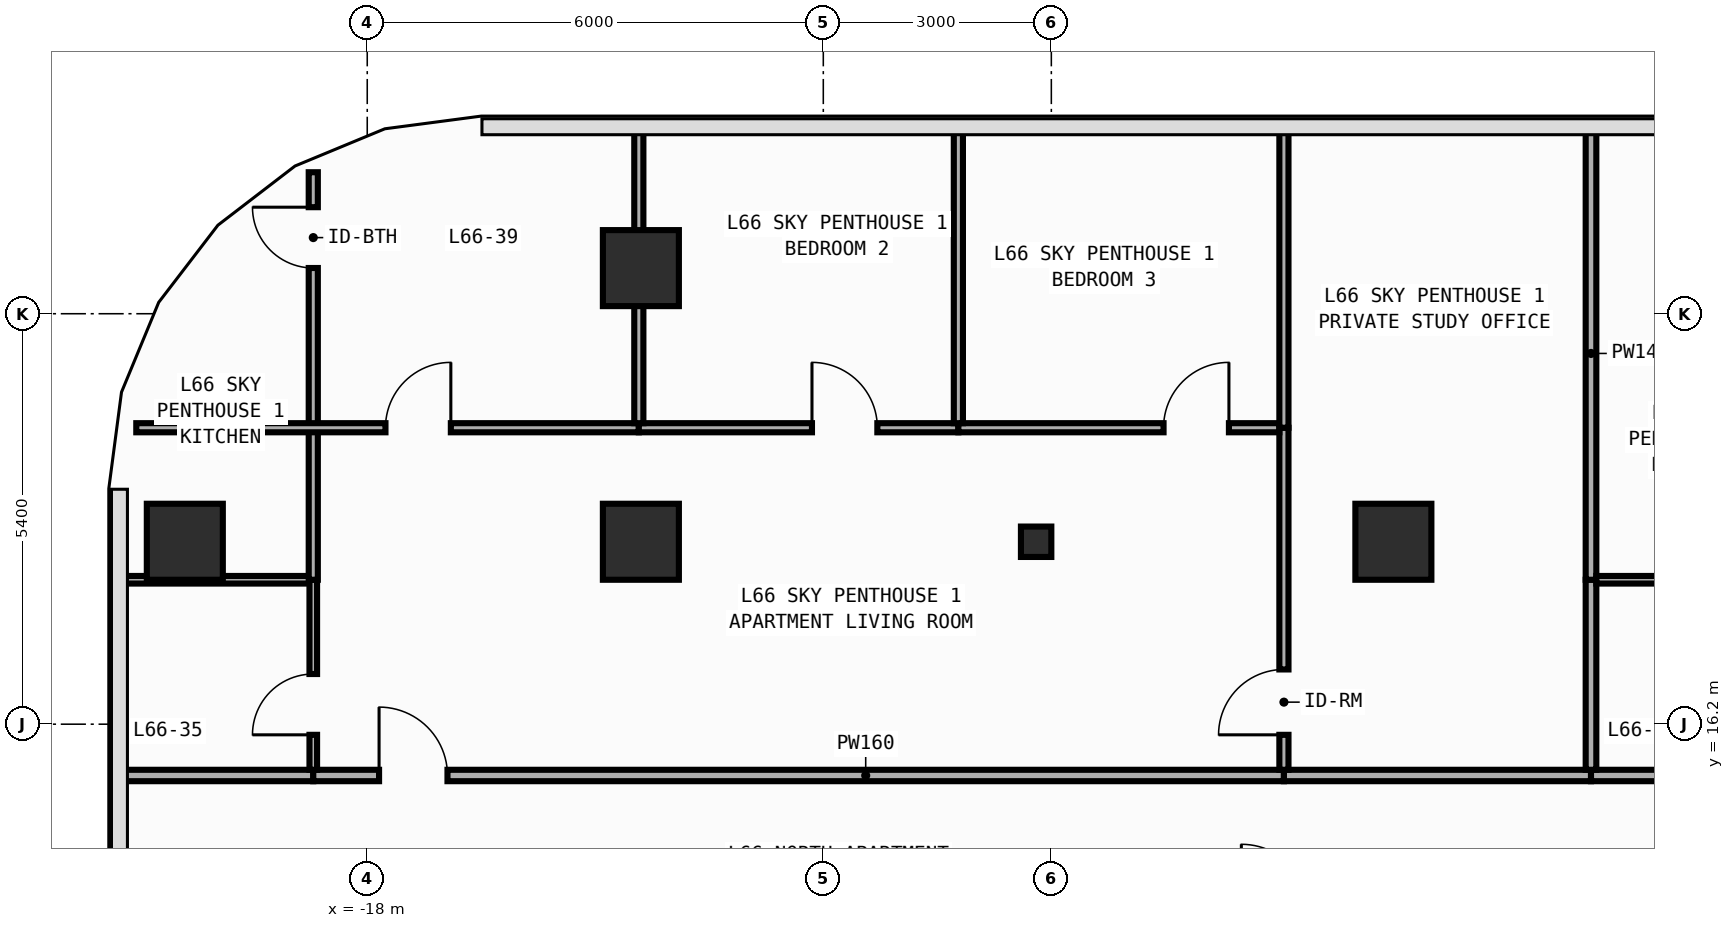
"""IFC4 building model, lengths in metres.
Left out: names, types, materials, properties, quantities, classifications, styles, units other than length and angle.
Written with IfcOpenShell. Run it as: python <this file> out.ifc"""

import sys

from ifc_helpers import new_model, si_unit, direction, frame, frame_2d, origin, origin_2d, place, context, subcontext, project, spatial, rectangle, circle, i_section, extrude, element, fill, save


model = new_model("IFC4")
c1 = context("Model", 3, precision=1e-05, world=origin(), true_north=direction((0.0, 1.0)))
c2 = subcontext(c1, "Body", "Model", "MODEL_VIEW")
j1 = project(units=[si_unit("LENGTHUNIT", "METRE"), si_unit("PLANEANGLEUNIT", "RADIAN")], contexts=[c1])
p1 = place(None, origin())
s1 = spatial("IfcSite", under=j1, at=p1, CompositionType="ELEMENT")
p2 = place(p1, origin())
s2 = spatial("IfcBuilding", under=s1, at=p2, CompositionType="ELEMENT")
p3 = place(p2, frame((0.0, 0.0, 277.6)))
s3 = spatial("IfcBuildingStorey", under=s2, at=p3, CompositionType="ELEMENT", Elevation=277.6)
p4 = place(p3, frame((-9.2, 18.6, 0.0), z_axis=(0.0, 0.0, 1.0), x_axis=(1.0, 0.0, 0.0)))
e1 = element("IfcColumn", 1, at=p4, inside=s3, PredefinedType="COLUMN", context=c2, shape_type="SweptSolid", body=[
    extrude(i_section(OverallWidth=0.4, OverallDepth=0.4, WebThickness=0.013, FlangeThickness=0.021, FilletRadius=0.022, at=origin_2d()), origin(), (0.0, 0.0, 1.0), 3.8),
])
for number, where, z_axis, x_axis in (
    (2, (-20.4, 18.6, 0.0), (0.0, 0.0, 1.0), (1.0, 0.0, 0.0)),
    (3, (-14.4, 18.6, 0.0), (0.0, 0.0, 1.0), (1.0, 0.0, 0.0)),
    (4, (-4.5, 18.6, 0.0), (0.0, 0.0, 1.0), (1.0, 0.0, 0.0)),
    (5, (-14.4, 22.2, 0.0), (0.0, 0.0, 1.0), (1.0, 0.0, 0.0)),
):
    element("IfcColumn", number, at=place(p3, frame(where, z_axis=z_axis, x_axis=x_axis)), inside=s3, PredefinedType="COLUMN", context=c2, shape_type="SweptSolid", body=[
        extrude(circle(Radius=0.5, at=origin_2d()), origin(), (0.0, 0.0, 1.0), 3.8),
    ])
p5 = place(p3, frame((-21.255, 15.525, 0.0), z_axis=(0.0, 0.0, 1.0), x_axis=(1.0, 0.0, 0.0)))
e6 = element("IfcWall", 6, at=p5, inside=s3, PredefinedType="PARTITIONING", context=c2, shape_type="SweptSolid", body=[
    extrude(rectangle(XDim=2.545, YDim=0.15, at=frame_2d((1.272, 0.0))), origin(), (0.0, 0.0, 1.0), 3.54),
])
p6 = place(p3, frame((-18.71, 15.525, 0.0), z_axis=(0.0, 0.0, 1.0), x_axis=(1.0, 0.0, 0.0)))
e7 = element("IfcWall", 7, at=p6, inside=s3, PredefinedType="PARTITIONING", context=c2, shape_type="SweptSolid", body=[
    extrude(rectangle(XDim=12.77, YDim=0.15, at=frame_2d((6.385, 0.0))), origin(), (0.0, 0.0, 1.0), 3.54),
])
p7 = place(p6, frame((0.865, 0.0, 0.0)))
e8 = element("IfcOpeningElement", 8, at=p7, cuts=e7, PredefinedType="OPENING", context=c2, shape_type="SweptSolid", body=[
    extrude(rectangle(XDim=0.9, YDim=2.15, at=frame_2d((0.45, 1.075))), frame((0.0, 0.085, 0.0), z_axis=(0.0, -1.0, 0.0), x_axis=(1.0, 0.0, 0.0)), (0.0, 0.0, 1.0), 0.17),
])
p8 = place(p3, frame((-5.94, 15.525, 0.0), z_axis=(0.0, 0.0, 1.0), x_axis=(1.0, 0.0, 0.0)))
e9 = element("IfcWall", 9, at=p8, inside=s3, PredefinedType="PARTITIONING", context=c2, shape_type="SweptSolid", body=[
    extrude(rectangle(XDim=4.04, YDim=0.15, at=frame_2d((2.02, 0.0))), origin(), (0.0, 0.0, 1.0), 3.54),
])
p9 = place(p3, frame((-1.9, 15.525, 0.0), z_axis=(0.0, 0.0, 1.0), x_axis=(1.0, 0.0, 0.0)))
e10 = element("IfcWall", 10, at=p9, inside=s3, PredefinedType="PARTITIONING", context=c2, shape_type="SweptSolid", body=[
    extrude(rectangle(XDim=2.59, YDim=0.15, at=frame_2d((1.295, 0.0))), origin(), (0.0, 0.0, 1.0), 3.54),
])
p10 = place(p3, frame((-21.255, 18.1, 0.0), z_axis=(0.0, 0.0, 1.0), x_axis=(1.0, 0.0, 0.0)))
e11 = element("IfcWall", 11, at=p10, inside=s3, PredefinedType="PARTITIONING", context=c2, shape_type="SweptSolid", body=[
    extrude(rectangle(XDim=2.495, YDim=0.1, at=frame_2d((1.248, 0.0))), origin(), (0.0, 0.0, 1.0), 3.54),
])
p11 = place(p3, frame((-18.71, 15.6, 0.0), z_axis=(0.0, 0.0, 1.0), x_axis=(0.0, 1.0, 0.0)))
e12 = element("IfcWall", 12, at=p11, inside=s3, PredefinedType="PARTITIONING", context=c2, shape_type="SweptSolid", body=[
    extrude(rectangle(XDim=2.5, YDim=0.1, at=frame_2d((1.25, 0.0))), origin(), (0.0, 0.0, 1.0), 3.54),
])
p12 = place(p11, frame((0.46, 0.0, 0.0)))
e13 = element("IfcOpeningElement", 13, at=p12, cuts=e12, PredefinedType="OPENING", context=c2, shape_type="SweptSolid", body=[
    extrude(rectangle(XDim=0.8, YDim=2.1, at=frame_2d((0.4, 1.05))), frame((0.0, 0.06, 0.0), z_axis=(0.0, -1.0, 0.0), x_axis=(1.0, 0.0, 0.0)), (0.0, 0.0, 1.0), 0.12),
])
p13 = place(p3, frame((-18.71, 18.1, 0.0), z_axis=(0.0, 0.0, 1.0), x_axis=(0.0, 1.0, 0.0)))
e14 = element("IfcWall", 14, at=p13, inside=s3, PredefinedType="PARTITIONING", context=c2, shape_type="SweptSolid", body=[
    extrude(rectangle(XDim=2.0, YDim=0.12, at=frame_2d((1.0, 0.0))), origin(), (0.0, 0.0, 1.0), 3.54),
])
p14 = place(p3, frame((-18.71, 20.1, 0.0), z_axis=(0.0, 0.0, 1.0), x_axis=(0.0, 1.0, 0.0)))
e15 = element("IfcWall", 15, at=p14, inside=s3, PredefinedType="PARTITIONING", context=c2, shape_type="SweptSolid", body=[
    extrude(rectangle(XDim=3.361, YDim=0.12, at=frame_2d((1.681, 0.0))), origin(), (0.0, 0.0, 1.0), 3.54),
])
p15 = place(p14, frame((2.102, 0.0, 0.0)))
e16 = element("IfcOpeningElement", 16, at=p15, cuts=e15, PredefinedType="OPENING", context=c2, shape_type="SweptSolid", body=[
    extrude(rectangle(XDim=0.8, YDim=2.1, at=frame_2d((0.4, 1.05))), frame((0.0, 0.07, 0.0), z_axis=(0.0, -1.0, 0.0), x_axis=(1.0, 0.0, 0.0)), (0.0, 0.0, 1.0), 0.14),
])
p16 = place(p3, frame((-5.94, 15.6, 0.0), z_axis=(0.0, 0.0, 1.0), x_axis=(0.0, 1.0, 0.0)))
e17 = element("IfcWall", 17, at=p16, inside=s3, PredefinedType="PARTITIONING", context=c2, shape_type="SweptSolid", body=[
    extrude(rectangle(XDim=4.5, YDim=0.12, at=frame_2d((2.25, 0.0))), origin(), (0.0, 0.0, 1.0), 3.54),
])
p17 = place(p16, frame((0.46, 0.0, 0.0)))
e18 = element("IfcOpeningElement", 18, at=p17, cuts=e17, PredefinedType="OPENING", context=c2, shape_type="SweptSolid", body=[
    extrude(rectangle(XDim=0.86, YDim=2.15, at=frame_2d((0.43, 1.075))), frame((0.0, 0.07, 0.0), z_axis=(0.0, -1.0, 0.0), x_axis=(1.0, 0.0, 0.0)), (0.0, 0.0, 1.0), 0.14),
])
p18 = place(p3, frame((-21.039, 20.1, 0.0), z_axis=(0.0, 0.0, 1.0), x_axis=(1.0, 0.0, 0.0)))
e19 = element("IfcWall", 19, at=p18, inside=s3, PredefinedType="PARTITIONING", context=c2, shape_type="SweptSolid", body=[
    extrude(rectangle(XDim=6.612, YDim=0.12, at=frame_2d((3.306, 0.0))), origin(), (0.0, 0.0, 1.0), 3.54),
])
p19 = place(p18, frame((3.278, 0.0, 0.0)))
e20 = element("IfcOpeningElement", 20, at=p19, cuts=e19, PredefinedType="OPENING", context=c2, shape_type="SweptSolid", body=[
    extrude(rectangle(XDim=0.86, YDim=2.15, at=frame_2d((0.43, 1.075))), frame((0.0, 0.07, 0.0), z_axis=(0.0, -1.0, 0.0), x_axis=(1.0, 0.0, 0.0)), (0.0, 0.0, 1.0), 0.14),
])
p20 = place(p3, frame((-14.427, 20.1, 0.0), z_axis=(0.0, 0.0, 1.0), x_axis=(1.0, 0.0, 0.0)))
e21 = element("IfcWall", 21, at=p20, inside=s3, PredefinedType="PARTITIONING", context=c2, shape_type="SweptSolid", body=[
    extrude(rectangle(XDim=4.204, YDim=0.12, at=frame_2d((2.102, 0.0))), origin(), (0.0, 0.0, 1.0), 3.54),
])
p21 = place(p20, frame((2.278, 0.0, 0.0)))
e22 = element("IfcOpeningElement", 22, at=p21, cuts=e21, PredefinedType="OPENING", context=c2, shape_type="SweptSolid", body=[
    extrude(rectangle(XDim=0.86, YDim=2.15, at=frame_2d((0.43, 1.075))), frame((0.0, 0.07, 0.0), z_axis=(0.0, -1.0, 0.0), x_axis=(1.0, 0.0, 0.0)), (0.0, 0.0, 1.0), 0.14),
])
p22 = place(p3, frame((-10.223, 20.1, 0.0), z_axis=(0.0, 0.0, 1.0), x_axis=(1.0, 0.0, 0.0)))
e23 = element("IfcWall", 23, at=p22, inside=s3, PredefinedType="PARTITIONING", context=c2, shape_type="SweptSolid", body=[
    extrude(rectangle(XDim=4.223, YDim=0.12, at=frame_2d((2.111, 0.0))), origin(), (0.0, 0.0, 1.0), 3.54),
])
p23 = place(p22, frame((2.699, 0.0, 0.0)))
e24 = element("IfcOpeningElement", 24, at=p23, cuts=e23, PredefinedType="OPENING", context=c2, shape_type="SweptSolid", body=[
    extrude(rectangle(XDim=0.86, YDim=2.15, at=frame_2d((0.43, 1.075))), frame((0.0, 0.07, 0.0), z_axis=(0.0, -1.0, 0.0), x_axis=(1.0, 0.0, 0.0)), (0.0, 0.0, 1.0), 0.14),
])
p24 = place(p3, frame((-5.94, 20.1, 0.0), z_axis=(0.0, 0.0, 1.0), x_axis=(0.0, 1.0, 0.0)))
e25 = element("IfcWall", 25, at=p24, inside=s3, PredefinedType="PARTITIONING", context=c2, shape_type="SweptSolid", body=[
    extrude(rectangle(XDim=3.955, YDim=0.12, at=frame_2d((1.978, 0.0))), origin(), (0.0, 0.0, 1.0), 3.54),
])
p25 = place(p3, frame((-1.9, 15.6, 0.0), z_axis=(0.0, 0.0, 1.0), x_axis=(0.0, 1.0, 0.0)))
e26 = element("IfcWall", 26, at=p25, inside=s3, PredefinedType="PARTITIONING", context=c2, shape_type="SweptSolid", body=[
    extrude(rectangle(XDim=2.5, YDim=0.14, at=frame_2d((1.25, 0.0))), origin(), (0.0, 0.0, 1.0), 3.54),
])
p26 = place(p3, frame((-1.9, 18.1, 0.0), z_axis=(0.0, 0.0, 1.0), x_axis=(0.0, 1.0, 0.0)))
e27 = element("IfcWall", 27, at=p26, inside=s3, PredefinedType="PARTITIONING", context=c2, shape_type="SweptSolid", body=[
    extrude(rectangle(XDim=5.955, YDim=0.14, at=frame_2d((2.978, 0.0))), origin(), (0.0, 0.0, 1.0), 3.54),
])
p27 = place(p3, frame((-14.427, 20.16, 0.0), z_axis=(0.0, 0.0, 1.0), x_axis=(0.0, 1.0, 0.0)))
e28 = element("IfcWall", 28, at=p27, inside=s3, PredefinedType="PARTITIONING", context=c2, shape_type="SweptSolid", body=[
    extrude(rectangle(XDim=3.895, YDim=0.12, at=frame_2d((1.948, 0.0))), origin(), (0.0, 0.0, 1.0), 2.64),
])
p28 = place(p3, frame((-10.223, 20.16, 0.0), z_axis=(0.0, 0.0, 1.0), x_axis=(0.0, 1.0, 0.0)))
e29 = element("IfcWall", 29, at=p28, inside=s3, PredefinedType="PARTITIONING", context=c2, shape_type="SweptSolid", body=[
    extrude(rectangle(XDim=3.895, YDim=0.12, at=frame_2d((1.948, 0.0))), origin(), (0.0, 0.0, 1.0), 3.54),
])
p29 = place(p3, frame((-1.83, 18.1, 0.0), z_axis=(0.0, 0.0, 1.0), x_axis=(1.0, 0.0, 0.0)))
e30 = element("IfcWall", 30, at=p29, inside=s3, PredefinedType="PARTITIONING", context=c2, shape_type="SweptSolid", body=[
    extrude(rectangle(XDim=2.47, YDim=0.1, at=frame_2d((1.235, 0.0))), origin(), (0.0, 0.0, 1.0), 3.54),
])
p30 = place(p7, origin())
e31 = element("IfcDoor", 31, at=p30, inside=s3, OperationType="SINGLE_SWING_LEFT", PredefinedType="DOOR", context=c2, shape_type="SweptSolid", body=[
    extrude(rectangle(XDim=0.9, YDim=2.15, at=frame_2d((0.45, 1.075))), frame((0.0, 0.025, 0.0), z_axis=(0.0, -1.0, 0.0), x_axis=(1.0, 0.0, 0.0)), (0.0, 0.0, 1.0), 0.05),
])
fill(e8, e31)
p31 = place(p12, origin())
e32 = element("IfcDoor", 32, at=p31, inside=s3, OperationType="SINGLE_SWING_LEFT", PredefinedType="DOOR", context=c2, shape_type="SweptSolid", body=[
    extrude(rectangle(XDim=0.8, YDim=2.1, at=frame_2d((0.4, 1.05))), frame((0.0, 0.025, 0.0), z_axis=(0.0, -1.0, 0.0), x_axis=(1.0, 0.0, 0.0)), (0.0, 0.0, 1.0), 0.05),
])
fill(e13, e32)
p32 = place(p17, origin())
e33 = element("IfcDoor", 33, at=p32, inside=s3, OperationType="SINGLE_SWING_LEFT", PredefinedType="DOOR", context=c2, shape_type="SweptSolid", body=[
    extrude(rectangle(XDim=0.86, YDim=2.15, at=frame_2d((0.43, 1.075))), frame((0.0, 0.025, 0.0), z_axis=(0.0, -1.0, 0.0), x_axis=(1.0, 0.0, 0.0)), (0.0, 0.0, 1.0), 0.05),
])
fill(e18, e33)
p33 = place(p19, origin())
e34 = element("IfcDoor", 34, at=p33, inside=s3, OperationType="SINGLE_SWING_RIGHT", PredefinedType="DOOR", context=c2, shape_type="SweptSolid", body=[
    extrude(rectangle(XDim=0.86, YDim=2.15, at=frame_2d((0.43, 1.075))), frame((0.0, 0.025, 0.0), z_axis=(0.0, -1.0, 0.0), x_axis=(1.0, 0.0, 0.0)), (0.0, 0.0, 1.0), 0.05),
])
fill(e20, e34)
p34 = place(p21, origin())
e35 = element("IfcDoor", 35, at=p34, inside=s3, OperationType="SINGLE_SWING_LEFT", PredefinedType="DOOR", context=c2, shape_type="SweptSolid", body=[
    extrude(rectangle(XDim=0.86, YDim=2.15, at=frame_2d((0.43, 1.075))), frame((0.0, 0.025, 0.0), z_axis=(0.0, -1.0, 0.0), x_axis=(1.0, 0.0, 0.0)), (0.0, 0.0, 1.0), 0.05),
])
fill(e22, e35)
p35 = place(p23, origin())
e36 = element("IfcDoor", 36, at=p35, inside=s3, OperationType="SINGLE_SWING_RIGHT", PredefinedType="DOOR", context=c2, shape_type="SweptSolid", body=[
    extrude(rectangle(XDim=0.86, YDim=2.15, at=frame_2d((0.43, 1.075))), frame((0.0, 0.025, 0.0), z_axis=(0.0, -1.0, 0.0), x_axis=(1.0, 0.0, 0.0)), (0.0, 0.0, 1.0), 0.05),
])
fill(e24, e36)
p36 = place(p15, origin())
e37 = element("IfcDoor", 37, at=p36, inside=s3, OperationType="SINGLE_SWING_RIGHT", PredefinedType="DOOR", context=c2, shape_type="SweptSolid", body=[
    extrude(rectangle(XDim=0.8, YDim=2.1, at=frame_2d((0.4, 1.05))), frame((0.0, 0.025, 0.0), z_axis=(0.0, -1.0, 0.0), x_axis=(1.0, 0.0, 0.0)), (0.0, 0.0, 1.0), 0.05),
])
fill(e16, e37)
save(model, sys.argv[1])
